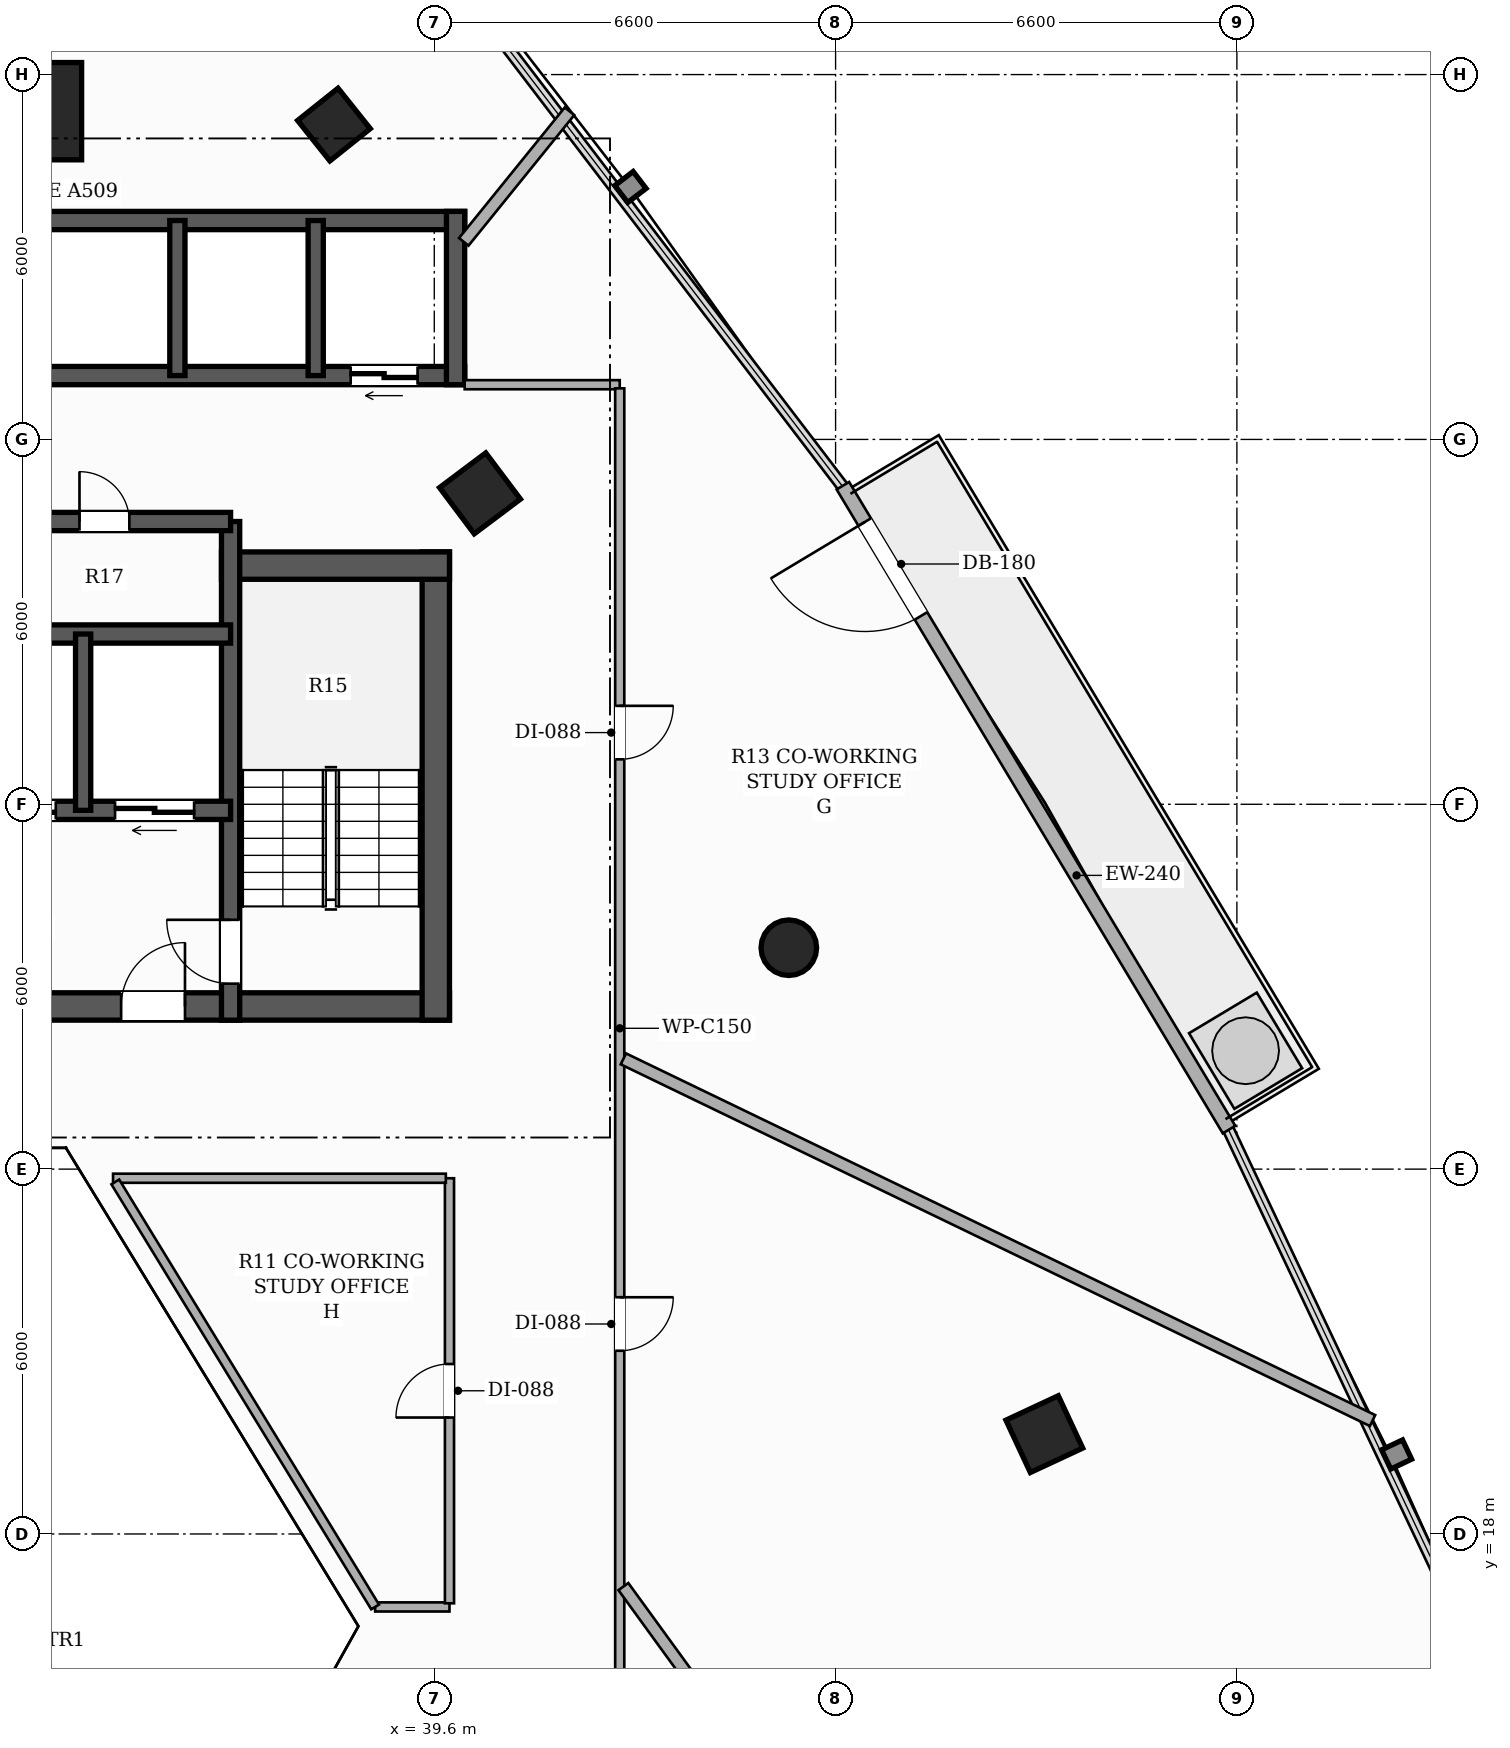
"""IFC4 building model, lengths in metres.
Left out: names, types, materials, properties, quantities, classifications, styles, units other than length and angle.
Written with IfcOpenShell. Run it as: python <this file> out.ifc"""

import sys

from ifc_helpers import new_model, si_unit, direction, frame, frame_2d, origin, origin_2d, place, context, subcontext, project, spatial, rectangle, hollow_rectangle, hollow_circle, extrude, element, fill, save


model = new_model("IFC4")
c1 = context("Model", 3, precision=1e-05, world=origin(), true_north=direction((0.0, 1.0)))
c2 = subcontext(c1, "Body", "Model", "MODEL_VIEW")
j1 = project(units=[si_unit("LENGTHUNIT", "METRE"), si_unit("PLANEANGLEUNIT", "RADIAN")], contexts=[c1])
p1 = place(None, origin())
s1 = spatial("IfcSite", under=j1, at=p1, CompositionType="ELEMENT")
p2 = place(p1, origin())
s2 = spatial("IfcBuilding", under=s1, at=p2, CompositionType="ELEMENT")
p3 = place(p2, frame((0.0, 0.0, 84.05)))
s3 = spatial("IfcBuildingStorey", under=s2, at=p3, CompositionType="ELEMENT", Elevation=84.05)
p4 = place(p3, frame((26.15, 26.675, 0.0), z_axis=(0.0, 0.0, 1.0), x_axis=(1.0, 0.0, 0.0)))
e1 = element("IfcWall", 1, at=p4, inside=s3, PredefinedType="SHEAR", context=c2, shape_type="SweptSolid", body=[
    extrude(rectangle(XDim=13.7, YDim=0.45, at=frame_2d((6.85, 0.0))), origin(), (0.0, 0.0, 1.0), 3.3),
])
p5 = place(p4, frame((4.35, 0.0, 0.0)))
e2 = element("IfcOpeningElement", 2, at=p5, cuts=e1, PredefinedType="OPENING", context=c2, shape_type="SweptSolid", body=[
    extrude(rectangle(XDim=1.05, YDim=2.15, at=frame_2d((0.525, 1.075))), frame((0.0, 0.235, 0.0), z_axis=(0.0, -1.0, 0.0), x_axis=(1.0, 0.0, 0.0)), (0.0, 0.0, 1.0), 0.47),
])
p6 = place(p4, frame((8.3, 0.0, 0.0)))
e3 = element("IfcOpeningElement", 3, at=p6, cuts=e1, PredefinedType="OPENING", context=c2, shape_type="SweptSolid", body=[
    extrude(rectangle(XDim=1.05, YDim=2.15, at=frame_2d((0.525, 1.075))), frame((0.0, 0.235, 0.0), z_axis=(0.0, -1.0, 0.0), x_axis=(1.0, 0.0, 0.0)), (0.0, 0.0, 1.0), 0.47),
])
p7 = place(p3, frame((39.625, 26.45, 0.0), z_axis=(0.0, 0.0, 1.0), x_axis=(0.0, 1.0, 0.0)))
e4 = element("IfcWall", 4, at=p7, inside=s3, PredefinedType="SHEAR", context=c2, shape_type="SweptSolid", body=[
    extrude(rectangle(XDim=7.7, YDim=0.45, at=frame_2d((3.85, 0.0))), origin(), (0.0, 0.0, 1.0), 3.3),
])
p8 = place(p3, frame((36.1, 33.925, 0.0), z_axis=(0.0, 0.0, 1.0), x_axis=(1.0, 0.0, 0.0)))
e5 = element("IfcWall", 5, at=p8, inside=s3, PredefinedType="SHEAR", context=c2, shape_type="SweptSolid", body=[
    extrude(rectangle(XDim=3.75, YDim=0.45, at=frame_2d((1.875, 0.0))), origin(), (0.0, 0.0, 1.0), 3.3),
])
p9 = place(p3, frame((36.25, 26.45, 0.0), z_axis=(0.0, 0.0, 1.0), x_axis=(0.0, 1.0, 0.0)))
e6 = element("IfcWall", 6, at=p9, inside=s3, PredefinedType="SHEAR", context=c2, shape_type="SweptSolid", body=[
    extrude(rectangle(XDim=8.2, YDim=0.3, at=frame_2d((4.1, 0.0))), origin(), (0.0, 0.0, 1.0), 3.3),
])
p10 = place(p9, frame((0.6, 0.0, 0.0)))
e7 = element("IfcOpeningElement", 7, at=p10, cuts=e6, PredefinedType="OPENING", context=c2, shape_type="SweptSolid", body=[
    extrude(rectangle(XDim=1.05, YDim=2.15, at=frame_2d((0.525, 1.075))), frame((0.0, 0.16, 0.0), z_axis=(0.0, -1.0, 0.0), x_axis=(1.0, 0.0, 0.0)), (0.0, 0.0, 1.0), 0.32),
])
p11 = place(p3, frame((36.25, 29.9, 0.0), z_axis=(0.0, 0.0, 1.0), x_axis=(-1.0, 0.0, 0.0)))
e8 = element("IfcWall", 8, at=p11, inside=s3, PredefinedType="SHEAR", context=c2, shape_type="SweptSolid", body=[
    extrude(rectangle(XDim=6.5, YDim=0.3, at=frame_2d((3.25, 0.0))), origin(), (0.0, 0.0, 1.0), 3.3),
])
p12 = place(p11, frame((4.875, 0.0, 0.0)))
e9 = element("IfcOpeningElement", 9, at=p12, cuts=e8, PredefinedType="OPENING", context=c2, shape_type="SweptSolid", body=[
    extrude(rectangle(XDim=1.1, YDim=2.2, at=frame_2d((0.55, 1.1))), frame((0.0, 0.16, 0.0), z_axis=(0.0, -1.0, 0.0), x_axis=(1.0, 0.0, 0.0)), (0.0, 0.0, 1.0), 0.32),
])
p13 = place(p11, frame((2.875, 0.0, 0.0)))
e10 = element("IfcOpeningElement", 10, at=p13, cuts=e8, PredefinedType="OPENING", context=c2, shape_type="SweptSolid", body=[
    extrude(rectangle(XDim=1.1, YDim=2.2, at=frame_2d((0.55, 1.1))), frame((0.0, 0.16, 0.0), z_axis=(0.0, -1.0, 0.0), x_axis=(1.0, 0.0, 0.0)), (0.0, 0.0, 1.0), 0.32),
])
p14 = place(p11, frame((0.6, 0.0, 0.0)))
e11 = element("IfcOpeningElement", 11, at=p14, cuts=e8, PredefinedType="OPENING", context=c2, shape_type="SweptSolid", body=[
    extrude(rectangle(XDim=1.3, YDim=2.2, at=frame_2d((0.65, 1.1))), frame((0.0, 0.16, 0.0), z_axis=(0.0, -1.0, 0.0), x_axis=(1.0, 0.0, 0.0)), (0.0, 0.0, 1.0), 0.32),
])
p15 = place(p3, frame((29.75, 32.8, 0.0), z_axis=(0.0, 0.0, 1.0), x_axis=(1.0, 0.0, 0.0)))
e12 = element("IfcWall", 12, at=p15, inside=s3, PredefinedType="SHEAR", context=c2, shape_type="SweptSolid", body=[
    extrude(rectangle(XDim=6.5, YDim=0.3, at=frame_2d((3.25, 0.0))), origin(), (0.0, 0.0, 1.0), 3.3),
])
p16 = place(p3, frame((33.825, 29.9, 0.0), z_axis=(0.0, 0.0, 1.0), x_axis=(0.0, 1.0, 0.0)))
e13 = element("IfcWall", 13, at=p16, inside=s3, PredefinedType="SHEAR", context=c2, shape_type="SweptSolid", body=[
    extrude(rectangle(XDim=2.9, YDim=0.25, at=frame_2d((1.45, 0.0))), origin(), (0.0, 0.0, 1.0), 3.3),
])
p17 = place(p3, frame((29.75, 34.65, 0.0), z_axis=(0.0, 0.0, 1.0), x_axis=(1.0, 0.0, 0.0)))
e14 = element("IfcWall", 14, at=p17, inside=s3, PredefinedType="SHEAR", context=c2, shape_type="SweptSolid", body=[
    extrude(rectangle(XDim=6.5, YDim=0.3, at=frame_2d((3.25, 0.0))), origin(), (0.0, 0.0, 1.0), 3.3),
])
p18 = place(p17, frame((0.915, 0.0, 0.0)))
e15 = element("IfcOpeningElement", 15, at=p18, cuts=e14, PredefinedType="OPENING", context=c2, shape_type="SweptSolid", body=[
    extrude(rectangle(XDim=0.82, YDim=2.1, at=frame_2d((0.41, 1.05))), frame((0.0, 0.16, 0.0), z_axis=(0.0, -1.0, 0.0), x_axis=(1.0, 0.0, 0.0)), (0.0, 0.0, 1.0), 0.32),
])
p19 = place(p17, frame((4.015, 0.0, 0.0)))
e16 = element("IfcOpeningElement", 16, at=p19, cuts=e14, PredefinedType="OPENING", context=c2, shape_type="SweptSolid", body=[
    extrude(rectangle(XDim=0.82, YDim=2.1, at=frame_2d((0.41, 1.05))), frame((0.0, 0.16, 0.0), z_axis=(0.0, -1.0, 0.0), x_axis=(1.0, 0.0, 0.0)), (0.0, 0.0, 1.0), 0.32),
])
p20 = place(p3, frame((40.1, 37.05, 0.0), z_axis=(0.0, 0.0, 1.0), x_axis=(-1.0, 0.0, 0.0)))
e17 = element("IfcWall", 17, at=p20, inside=s3, PredefinedType="SHEAR", context=c2, shape_type="SweptSolid", body=[
    extrude(rectangle(XDim=14.2, YDim=0.3, at=frame_2d((7.1, 0.0))), origin(), (0.0, 0.0, 1.0), 3.3),
])
p21 = place(p20, frame((12.325, 0.0, 0.0)))
e18 = element("IfcOpeningElement", 18, at=p21, cuts=e17, PredefinedType="OPENING", context=c2, shape_type="SweptSolid", body=[
    extrude(rectangle(XDim=1.1, YDim=2.2, at=frame_2d((0.55, 1.1))), frame((0.0, 0.16, 0.0), z_axis=(0.0, -1.0, 0.0), x_axis=(1.0, 0.0, 0.0)), (0.0, 0.0, 1.0), 0.32),
])
p22 = place(p20, frame((0.775, 0.0, 0.0)))
e19 = element("IfcOpeningElement", 19, at=p22, cuts=e17, PredefinedType="OPENING", context=c2, shape_type="SweptSolid", body=[
    extrude(rectangle(XDim=1.1, YDim=2.2, at=frame_2d((0.55, 1.1))), frame((0.0, 0.16, 0.0), z_axis=(0.0, -1.0, 0.0), x_axis=(1.0, 0.0, 0.0)), (0.0, 0.0, 1.0), 0.32),
])
p23 = place(p3, frame((25.9, 39.6, 0.0), z_axis=(0.0, 0.0, 1.0), x_axis=(1.0, 0.0, 0.0)))
e20 = element("IfcWall", 20, at=p23, inside=s3, PredefinedType="SHEAR", context=c2, shape_type="SweptSolid", body=[
    extrude(rectangle(XDim=14.2, YDim=0.3, at=frame_2d((7.1, 0.0))), origin(), (0.0, 0.0, 1.0), 3.3),
])
p24 = place(p3, frame((39.95, 36.9, 0.0), z_axis=(0.0, 0.0, 1.0), x_axis=(0.0, 1.0, 0.0)))
e21 = element("IfcWall", 21, at=p24, inside=s3, PredefinedType="SHEAR", context=c2, shape_type="SweptSolid", body=[
    extrude(rectangle(XDim=2.85, YDim=0.3, at=frame_2d((1.425, 0.0))), origin(), (0.0, 0.0, 1.0), 3.3),
])
for number, where, z_axis, x_axis in (
    (22, (35.375, 37.05, 0.0), (0.0, 0.0, 1.0), (0.0, 1.0, 0.0)),
    (23, (37.65, 37.05, 0.0), (0.0, 0.0, 1.0), (0.0, 1.0, 0.0)),
):
    element("IfcWall", number, at=place(p3, frame(where, z_axis=z_axis, x_axis=x_axis)), inside=s3, PredefinedType="SHEAR", context=c2, shape_type="SweptSolid", body=[
        extrude(rectangle(XDim=2.55, YDim=0.25, at=frame_2d((1.275, 0.0))), origin(), (0.0, 0.0, 1.0), 3.3),
    ])
p25 = place(p3, frame((33.0, 41.398, 0.0), z_axis=(0.0, 0.0, 1.0), x_axis=(1.0, 0.0, 0.0)))
e24 = element("IfcColumn", 24, at=p25, inside=s3, PredefinedType="COLUMN", context=c2, shape_type="SweptSolid", body=[
    extrude(hollow_rectangle(XDim=1.6, YDim=1.6, WallThickness=0.05, at=origin_2d()), origin(), (0.0, 0.0, 1.0), 3.3),
])
p26 = place(p3, frame((49.633, 19.642, 0.0), z_axis=(0.0, 0.0, 1.0), x_axis=(-0.422618261741, 0.906307787037, 0.0)))
e25 = element("IfcColumn", 25, at=p26, inside=s3, PredefinedType="COLUMN", context=c2, shape_type="SweptSolid", body=[
    extrude(hollow_rectangle(XDim=0.95, YDim=0.95, WallThickness=0.032, at=origin_2d()), origin(), (0.0, 0.0, 1.0), 3.3),
])
p27 = place(p3, frame((45.431, 27.641, 0.0), z_axis=(0.0, 0.0, 1.0), x_axis=(1.0, 0.0, 0.0)))
e26 = element("IfcColumn", 26, at=p27, inside=s3, PredefinedType="COLUMN", context=c2, shape_type="SweptSolid", body=[
    extrude(hollow_circle(Radius=0.457, WallThickness=0.025, at=origin_2d()), origin(), (0.0, 0.0, 1.0), 3.3),
])
p28 = place(p3, frame((40.352, 35.113, 0.0), z_axis=(0.0, 0.0, 1.0), x_axis=(-0.600420225326, 0.799684658487, 0.0)))
e27 = element("IfcColumn", 27, at=p28, inside=s3, PredefinedType="COLUMN", context=c2, shape_type="SweptSolid", body=[
    extrude(hollow_rectangle(XDim=0.95, YDim=0.95, WallThickness=0.032, at=origin_2d()), origin(), (0.0, 0.0, 1.0), 3.3),
])
p29 = place(p3, frame((37.95, 41.178, 0.0), z_axis=(0.0, 0.0, 1.0), x_axis=(-0.623879596709, 0.781520472419, 0.0)))
e28 = element("IfcColumn", 28, at=p29, inside=s3, PredefinedType="COLUMN", context=c2, shape_type="SweptSolid", body=[
    extrude(hollow_rectangle(XDim=0.85, YDim=0.85, WallThickness=0.028, at=origin_2d()), origin(), (0.0, 0.0, 1.0), 3.3),
])
p30 = place(p3, frame((52.671, 24.65, 0.0), z_axis=(0.0, 0.0, 1.0), x_axis=(-0.514338730901, 0.857587120877, 0.0)))
e29 = element("IfcWall", 29, at=p30, inside=s3, PredefinedType="SOLIDWALL", context=c2, shape_type="SweptSolid", body=[
    extrude(rectangle(XDim=12.348, YDim=0.24, at=frame_2d((6.174, 0.0))), origin(), (0.0, 0.0, 1.0), 2.624),
])
p31 = place(p30, frame((9.85, 0.0, 0.0)))
e30 = element("IfcOpeningElement", 30, at=p31, cuts=e29, PredefinedType="OPENING", context=c2, shape_type="SweptSolid", body=[
    extrude(rectangle(XDim=1.8, YDim=2.2, at=frame_2d((0.9, 1.1))), frame((0.0, 0.13, 0.0), z_axis=(0.0, -1.0, 0.0), x_axis=(1.0, 0.0, 0.0)), (0.0, 0.0, 1.0), 0.26),
])
p32 = place(p3, frame((40.1, 36.9, 0.0), z_axis=(0.0, 0.0, 1.0), x_axis=(1.0, 0.0, 0.0)))
e31 = element("IfcWall", 31, at=p32, inside=s3, PredefinedType="PARTITIONING", context=c2, shape_type="SweptSolid", body=[
    extrude(rectangle(XDim=2.55, YDim=0.15, at=frame_2d((1.275, 0.0))), origin(), (0.0, 0.0, 1.0), 2.413),
])
p33 = place(p3, frame((42.65, 36.84, 0.0), z_axis=(0.0, 0.0, 1.0), x_axis=(0.0, -1.0, 0.0)))
e32 = element("IfcWall", 32, at=p33, inside=s3, PredefinedType="PARTITIONING", context=c2, shape_type="SweptSolid", body=[
    extrude(rectangle(XDim=25.04, YDim=0.15, at=frame_2d((12.52, 0.0))), origin(), (0.0, 0.0, 1.0), 2.413),
])
p34 = place(p33, frame((14.947, 0.0, 0.0)))
e33 = element("IfcOpeningElement", 33, at=p34, cuts=e32, PredefinedType="OPENING", context=c2, shape_type="SweptSolid", body=[
    extrude(rectangle(XDim=0.88, YDim=2.1, at=frame_2d((0.44, 1.05))), frame((0.0, 0.085, 0.0), z_axis=(0.0, -1.0, 0.0), x_axis=(1.0, 0.0, 0.0)), (0.0, 0.0, 1.0), 0.17),
])
p35 = place(p33, frame((21.741, 0.0, 0.0)))
e34 = element("IfcOpeningElement", 34, at=p35, cuts=e32, PredefinedType="OPENING", context=c2, shape_type="SweptSolid", body=[
    extrude(rectangle(XDim=0.88, YDim=2.1, at=frame_2d((0.44, 1.05))), frame((0.0, 0.085, 0.0), z_axis=(0.0, -1.0, 0.0), x_axis=(1.0, 0.0, 0.0)), (0.0, 0.0, 1.0), 0.17),
])
p36 = place(p33, frame((5.221, 0.0, 0.0)))
e35 = element("IfcOpeningElement", 35, at=p36, cuts=e32, PredefinedType="OPENING", context=c2, shape_type="SweptSolid", body=[
    extrude(rectangle(XDim=0.88, YDim=2.1, at=frame_2d((0.44, 1.05))), frame((0.0, 0.085, 0.0), z_axis=(0.0, -1.0, 0.0), x_axis=(1.0, 0.0, 0.0)), (0.0, 0.0, 1.0), 0.17),
])
p37 = place(p3, frame((38.627, 16.8, 0.0), z_axis=(0.0, 0.0, 1.0), x_axis=(1.0, 0.0, 0.0)))
e36 = element("IfcWall", 36, at=p37, inside=s3, PredefinedType="PARTITIONING", context=c2, shape_type="SweptSolid", body=[
    extrude(rectangle(XDim=1.223, YDim=0.15, at=frame_2d((0.612, 0.0))), origin(), (0.0, 0.0, 1.0), 3.06),
])
p38 = place(p3, frame((39.85, 16.86, 0.0), z_axis=(0.0, 0.0, 1.0), x_axis=(0.0, 1.0, 0.0)))
e37 = element("IfcWall", 37, at=p38, inside=s3, PredefinedType="PARTITIONING", context=c2, shape_type="SweptSolid", body=[
    extrude(rectangle(XDim=6.99, YDim=0.15, at=frame_2d((3.495, 0.0))), origin(), (0.0, 0.0, 1.0), 2.669),
])
p39 = place(p38, frame((3.055, 0.0, 0.0)))
e38 = element("IfcOpeningElement", 38, at=p39, cuts=e37, PredefinedType="OPENING", context=c2, shape_type="SweptSolid", body=[
    extrude(rectangle(XDim=0.88, YDim=2.1, at=frame_2d((0.44, 1.05))), frame((0.0, 0.085, 0.0), z_axis=(0.0, -1.0, 0.0), x_axis=(1.0, 0.0, 0.0)), (0.0, 0.0, 1.0), 0.17),
])
p40 = place(p3, frame((39.79, 23.85, 0.0), z_axis=(0.0, 0.0, 1.0), x_axis=(-1.0, 0.0, 0.0)))
e39 = element("IfcWall", 39, at=p40, inside=s3, PredefinedType="PARTITIONING", context=c2, shape_type="SweptSolid", body=[
    extrude(rectangle(XDim=5.473, YDim=0.15, at=frame_2d((2.737, 0.0))), origin(), (0.0, 0.0, 1.0), 2.669),
])
p41 = place(p3, frame((34.354, 23.79, 0.0), z_axis=(0.0, 0.0, 1.0), x_axis=(0.521564518198, -0.853211845533, 0.0)))
e40 = element("IfcWall", 40, at=p41, inside=s3, PredefinedType="PARTITIONING", context=c2, shape_type="SweptSolid", body=[
    extrude(rectangle(XDim=8.193, YDim=0.15, at=frame_2d((4.096, 0.0))), origin(), (0.0, 0.0, 1.0), 2.669),
])
p42 = place(p3, frame((41.824, 41.397, 0.0), z_axis=(0.0, 0.0, 1.0), x_axis=(-0.629241429285, -0.777209896792, 0.0)))
e41 = element("IfcWall", 41, at=p42, inside=s3, PredefinedType="PARTITIONING", context=c2, shape_type="SweptSolid", body=[
    extrude(rectangle(XDim=2.764, YDim=0.2, at=frame_2d((1.382, 0.0))), origin(), (0.0, 0.0, 1.0), 3.06),
])
p43 = place(p3, frame((52.557, 3.582, 0.0), z_axis=(0.0, 0.0, 1.0), x_axis=(-0.587789493476, 0.809013912958, 0.0)))
e42 = element("IfcWall", 42, at=p43, inside=s3, PredefinedType="PARTITIONING", context=c2, shape_type="SweptSolid", body=[
    extrude(rectangle(XDim=16.752, YDim=0.2, at=frame_2d((8.376, 0.0))), origin(), (0.0, 0.0, 1.0), 2.413),
])
p44 = place(p3, frame((42.71, 25.813, 0.0), z_axis=(0.0, 0.0, 1.0), x_axis=(0.900554286339, -0.434743576556, 0.0)))
e43 = element("IfcWall", 43, at=p44, inside=s3, PredefinedType="PARTITIONING", context=c2, shape_type="SweptSolid", body=[
    extrude(rectangle(XDim=13.682, YDim=0.2, at=frame_2d((6.841, 0.0))), origin(), (0.0, 0.0, 1.0), 2.413),
])
p45 = place(p31, origin())
e44 = element("IfcDoor", 44, at=p45, inside=s3, OperationType="SINGLE_SWING_RIGHT", PredefinedType="DOOR", context=c2, shape_type="SweptSolid", body=[
    extrude(rectangle(XDim=1.8, YDim=2.2, at=frame_2d((0.9, 1.1))), frame((0.0, 0.025, 0.0), z_axis=(0.0, -1.0, 0.0), x_axis=(1.0, 0.0, 0.0)), (0.0, 0.0, 1.0), 0.05),
])
fill(e30, e44)
p46 = place(p10, origin())
e45 = element("IfcDoor", 45, at=p46, inside=s3, OperationType="SINGLE_SWING_RIGHT", PredefinedType="DOOR", context=c2, shape_type="SweptSolid", body=[
    extrude(rectangle(XDim=1.05, YDim=2.15, at=frame_2d((0.525, 1.075))), frame((0.0, 0.025, 0.0), z_axis=(0.0, -1.0, 0.0), x_axis=(1.0, 0.0, 0.0)), (0.0, 0.0, 1.0), 0.05),
])
fill(e7, e45)
p47 = place(p6, origin())
e46 = element("IfcDoor", 46, at=p47, inside=s3, OperationType="SINGLE_SWING_RIGHT", PredefinedType="DOOR", context=c2, shape_type="SweptSolid", body=[
    extrude(rectangle(XDim=1.05, YDim=2.15, at=frame_2d((0.525, 1.075))), frame((0.0, 0.025, 0.0), z_axis=(0.0, -1.0, 0.0), x_axis=(1.0, 0.0, 0.0)), (0.0, 0.0, 1.0), 0.05),
])
fill(e3, e46)
p48 = place(p13, origin())
e47 = element("IfcDoor", 47, at=p48, inside=s3, OperationType="DOUBLE_DOOR_SLIDING", PredefinedType="DOOR", context=c2, shape_type="SweptSolid", body=[
    extrude(rectangle(XDim=1.1, YDim=2.2, at=frame_2d((0.55, 1.1))), frame((0.0, 0.025, 0.0), z_axis=(0.0, -1.0, 0.0), x_axis=(1.0, 0.0, 0.0)), (0.0, 0.0, 1.0), 0.05),
])
fill(e10, e47)
p49 = place(p14, origin())
e48 = element("IfcDoor", 48, at=p49, inside=s3, OperationType="DOUBLE_DOOR_SLIDING", PredefinedType="DOOR", context=c2, shape_type="SweptSolid", body=[
    extrude(rectangle(XDim=1.3, YDim=2.2, at=frame_2d((0.65, 1.1))), frame((0.0, 0.025, 0.0), z_axis=(0.0, -1.0, 0.0), x_axis=(1.0, 0.0, 0.0)), (0.0, 0.0, 1.0), 0.05),
])
fill(e11, e48)
p50 = place(p22, origin())
e49 = element("IfcDoor", 49, at=p50, inside=s3, OperationType="DOUBLE_DOOR_SLIDING", PredefinedType="DOOR", context=c2, shape_type="SweptSolid", body=[
    extrude(rectangle(XDim=1.1, YDim=2.2, at=frame_2d((0.55, 1.1))), frame((0.0, 0.025, 0.0), z_axis=(0.0, -1.0, 0.0), x_axis=(1.0, 0.0, 0.0)), (0.0, 0.0, 1.0), 0.05),
])
fill(e19, e49)
p51 = place(p19, origin())
e50 = element("IfcDoor", 50, at=p51, inside=s3, OperationType="SINGLE_SWING_LEFT", PredefinedType="DOOR", context=c2, shape_type="SweptSolid", body=[
    extrude(rectangle(XDim=0.82, YDim=2.1, at=frame_2d((0.41, 1.05))), frame((0.0, 0.025, 0.0), z_axis=(0.0, -1.0, 0.0), x_axis=(1.0, 0.0, 0.0)), (0.0, 0.0, 1.0), 0.05),
])
fill(e16, e50)
p52 = place(p34, origin())
e51 = element("IfcDoor", 51, at=p52, inside=s3, OperationType="SINGLE_SWING_LEFT", PredefinedType="DOOR", context=c2, shape_type="SweptSolid", body=[
    extrude(rectangle(XDim=0.88, YDim=2.1, at=frame_2d((0.44, 1.05))), frame((0.0, 0.025, 0.0), z_axis=(0.0, -1.0, 0.0), x_axis=(1.0, 0.0, 0.0)), (0.0, 0.0, 1.0), 0.05),
])
fill(e33, e51)
p53 = place(p36, origin())
e52 = element("IfcDoor", 52, at=p53, inside=s3, OperationType="SINGLE_SWING_LEFT", PredefinedType="DOOR", context=c2, shape_type="SweptSolid", body=[
    extrude(rectangle(XDim=0.88, YDim=2.1, at=frame_2d((0.44, 1.05))), frame((0.0, 0.025, 0.0), z_axis=(0.0, -1.0, 0.0), x_axis=(1.0, 0.0, 0.0)), (0.0, 0.0, 1.0), 0.05),
])
fill(e35, e52)
p54 = place(p39, origin())
e53 = element("IfcDoor", 53, at=p54, inside=s3, OperationType="SINGLE_SWING_LEFT", PredefinedType="DOOR", context=c2, shape_type="SweptSolid", body=[
    extrude(rectangle(XDim=0.88, YDim=2.1, at=frame_2d((0.44, 1.05))), frame((0.0, 0.025, 0.0), z_axis=(0.0, -1.0, 0.0), x_axis=(1.0, 0.0, 0.0)), (0.0, 0.0, 1.0), 0.05),
])
fill(e38, e53)
save(model, sys.argv[1])
